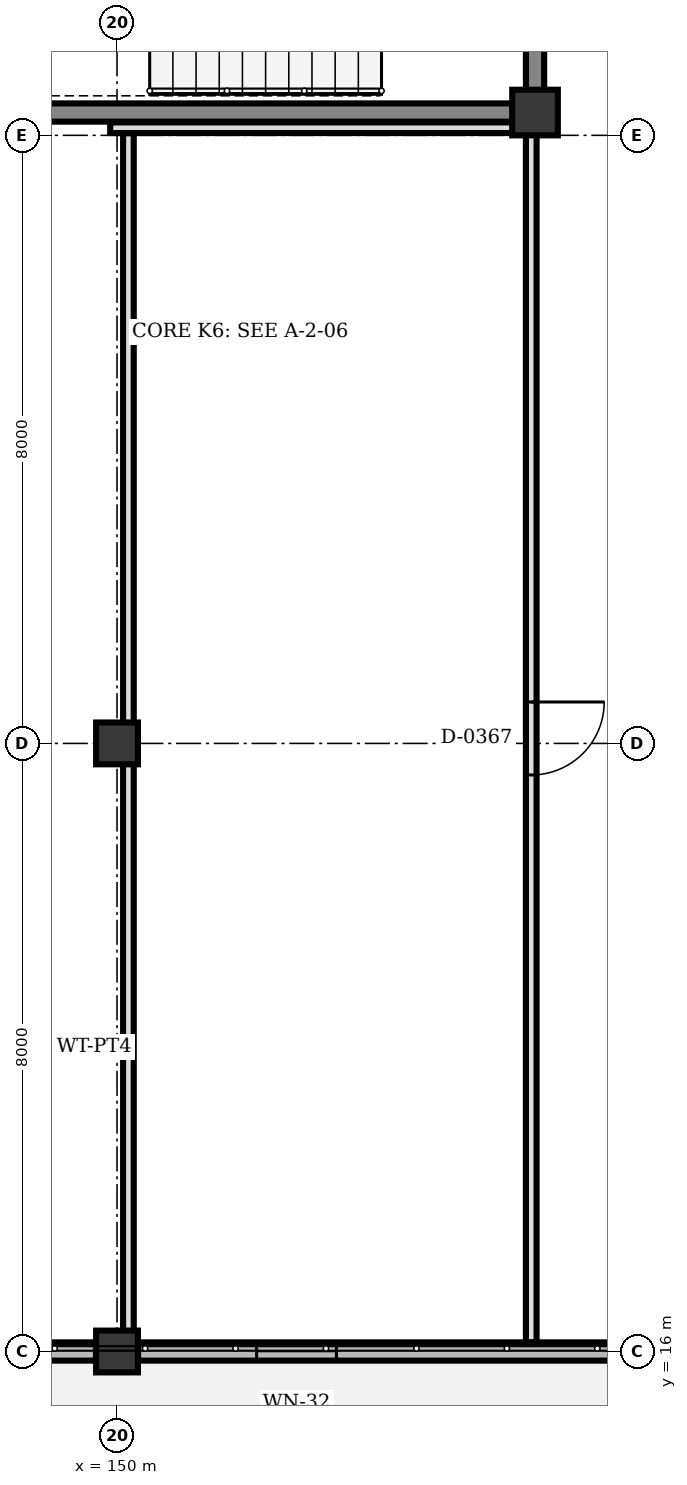
"""IFC4 building model, lengths in metres.
Left out: names, types, materials, properties, quantities, classifications, styles, units other than length and angle.
Written with IfcOpenShell. Run it as: python <this file> out.ifc"""

import sys

from ifc_helpers import new_model, si_unit, direction, frame, frame_2d, origin, origin_2d, place, context, subcontext, project, spatial, rectangle, extrude, element, fill, save


model = new_model("IFC4")
c1 = context("Model", 3, precision=1e-05, world=origin(), true_north=direction((0.0, 1.0)))
c2 = subcontext(c1, "Body", "Model", "MODEL_VIEW")
j1 = project(units=[si_unit("LENGTHUNIT", "METRE"), si_unit("PLANEANGLEUNIT", "RADIAN")], contexts=[c1])
p1 = place(None, origin())
s1 = spatial("IfcSite", under=j1, at=p1, CompositionType="ELEMENT")
p2 = place(p1, origin())
s2 = spatial("IfcBuilding", under=s1, at=p2, CompositionType="ELEMENT")
p3 = place(p2, frame((0.0, 0.0, 8.5)))
s3 = spatial("IfcBuildingStorey", under=s2, at=p3, CompositionType="ELEMENT", Elevation=8.5)
p4 = place(p3, frame((155.5, 32.3, 0.0), z_axis=(0.0, 0.0, 1.0), x_axis=(1.0, 0.0, 0.0)))
e1 = element("IfcColumn", 1, at=p4, inside=s3, PredefinedType="COLUMN", context=c2, shape_type="SweptSolid", body=[
    extrude(rectangle(XDim=0.6, YDim=0.6, at=origin_2d()), origin(), (0.0, 0.0, 1.0), 4.0),
])
for number, where, z_axis, x_axis in (
    (2, (150.0, 16.0, 0.0), (0.0, 0.0, 1.0), (1.0, 0.0, 0.0)),
    (3, (150.0, 24.0, 0.0), (0.0, 0.0, 1.0), (1.0, 0.0, 0.0)),
):
    element("IfcColumn", number, at=place(p3, frame(where, z_axis=z_axis, x_axis=x_axis)), inside=s3, PredefinedType="COLUMN", context=c2, shape_type="SweptSolid", body=[
        extrude(rectangle(XDim=0.55, YDim=0.55, at=origin_2d()), origin(), (0.0, 0.0, 1.0), 4.0),
    ])
p5 = place(p3, frame((157.723, 16.0, 0.0), z_axis=(0.0, 0.0, 1.0), x_axis=(-1.0, 0.0, 0.0)))
e4 = element("IfcWall", 4, at=p5, inside=s3, PredefinedType="SOLIDWALL", context=c2, shape_type="SweptSolid", body=[
    extrude(rectangle(XDim=7.446, YDim=0.24, at=frame_2d((3.723, 0.0))), origin(), (0.0, 0.0, 1.0), 3.002),
])
p6 = place(p5, frame((4.836, 0.0, 0.9)))
e5 = element("IfcOpeningElement", 5, at=p6, cuts=e4, PredefinedType="OPENING", context=c2, shape_type="SweptSolid", body=[
    extrude(rectangle(XDim=1.05, YDim=1.55, at=frame_2d((0.525, 0.775))), frame((0.0, 0.13, 0.0), z_axis=(0.0, -1.0, 0.0), x_axis=(1.0, 0.0, 0.0)), (0.0, 0.0, 1.0), 0.26),
])
p7 = place(p3, frame((149.723, 16.0, 0.0), z_axis=(0.0, 0.0, 1.0), x_axis=(-1.0, 0.0, 0.0)))
e6 = element("IfcWall", 6, at=p7, inside=s3, PredefinedType="SOLIDWALL", context=c2, shape_type="SweptSolid", body=[
    extrude(rectangle(XDim=7.446, YDim=0.24, at=frame_2d((3.723, 0.0))), origin(), (0.0, 0.0, 1.0), 3.002),
])
p8 = place(p7, frame((3.048, 0.0, 0.9)))
e7 = element("IfcOpeningElement", 7, at=p8, cuts=e6, PredefinedType="OPENING", context=c2, shape_type="SweptSolid", body=[
    extrude(rectangle(XDim=1.35, YDim=1.55, at=frame_2d((0.675, 0.775))), frame((0.0, 0.13, 0.0), z_axis=(0.0, -1.0, 0.0), x_axis=(1.0, 0.0, 0.0)), (0.0, 0.0, 1.0), 0.26),
])
p9 = place(p3, frame((155.5, 36.908, 0.0), z_axis=(0.0, 0.0, 1.0), x_axis=(0.0, -1.0, 0.0)))
e8 = element("IfcWall", 8, at=p9, inside=s3, PredefinedType="SHEAR", context=c2, shape_type="SweptSolid", body=[
    extrude(rectangle(XDim=4.316, YDim=0.24, at=frame_2d((2.158, 0.0))), origin(), (0.0, 0.0, 1.0), 3.74),
])
p10 = place(p9, frame((1.718, 0.0, 0.0)))
e9 = element("IfcOpeningElement", 9, at=p10, cuts=e8, PredefinedType="OPENING", context=c2, shape_type="SweptSolid", body=[
    extrude(rectangle(XDim=0.88, YDim=2.1, at=frame_2d((0.44, 1.05))), frame((0.0, 0.13, 0.0), z_axis=(0.0, -1.0, 0.0), x_axis=(1.0, 0.0, 0.0)), (0.0, 0.0, 1.0), 0.26),
])
p11 = place(p3, frame((155.208, 32.3, 0.0), z_axis=(0.0, 0.0, 1.0), x_axis=(-1.0, 0.0, 0.0)))
e10 = element("IfcWall", 10, at=p11, inside=s3, PredefinedType="SHEAR", context=c2, shape_type="SweptSolid", body=[
    extrude(rectangle(XDim=7.316, YDim=0.24, at=frame_2d((3.658, 0.0))), origin(), (0.0, 0.0, 1.0), 3.74),
])
p12 = place(p3, frame((149.91, 32.1, 0.0), z_axis=(0.0, 0.0, 1.0), x_axis=(1.0, 0.0, 0.0)))
e11 = element("IfcWall", 11, at=p12, inside=s3, PredefinedType="PARTITIONING", context=c2, shape_type="SweptSolid", body=[
    extrude(rectangle(XDim=5.298, YDim=0.14, at=frame_2d((2.649, 0.0))), origin(), (0.0, 0.0, 1.0), 3.7),
])
p13 = place(p3, frame((155.45, 32.008, 0.0), z_axis=(0.0, 0.0, 1.0), x_axis=(0.0, -1.0, 0.0)))
e12 = element("IfcWall", 12, at=p13, inside=s3, PredefinedType="PARTITIONING", context=c2, shape_type="SweptSolid", body=[
    extrude(rectangle(XDim=15.885, YDim=0.14, at=frame_2d((7.942, 0.0))), origin(), (0.0, 0.0, 1.0), 3.002),
])
p14 = place(p13, frame((7.463, 0.0, 0.0)))
e13 = element("IfcOpeningElement", 13, at=p14, cuts=e12, PredefinedType="OPENING", context=c2, shape_type="SweptSolid", body=[
    extrude(rectangle(XDim=0.96, YDim=2.1, at=frame_2d((0.48, 1.05))), frame((0.0, 0.08, 0.0), z_axis=(0.0, -1.0, 0.0), x_axis=(1.0, 0.0, 0.0)), (0.0, 0.0, 1.0), 0.16),
])
p15 = place(p3, frame((150.15, 16.267, 0.0), z_axis=(0.0, 0.0, 1.0), x_axis=(0.0, 1.0, 0.0)))
e14 = element("IfcWall", 14, at=p15, inside=s3, PredefinedType="PARTITIONING", context=c2, shape_type="SweptSolid", body=[
    extrude(rectangle(XDim=7.466, YDim=0.14, at=frame_2d((3.733, 0.0))), origin(), (0.0, 0.0, 1.0), 3.002),
])
p16 = place(p3, frame((150.15, 24.267, 0.0), z_axis=(0.0, 0.0, 1.0), x_axis=(0.0, 1.0, 0.0)))
e15 = element("IfcWall", 15, at=p16, inside=s3, PredefinedType="PARTITIONING", context=c2, shape_type="SweptSolid", body=[
    extrude(rectangle(XDim=7.76, YDim=0.14, at=frame_2d((3.88, 0.0))), origin(), (0.0, 0.0, 1.0), 3.002),
])
p17 = place(p6, origin())
e16 = element("IfcWindow", 16, at=p17, inside=s3, PartitioningType="SINGLE_PANEL", PredefinedType="WINDOW", context=c2, shape_type="SweptSolid", body=[
    extrude(rectangle(XDim=1.05, YDim=1.55, at=frame_2d((0.525, 0.775))), frame((0.0, 0.03, 0.0), z_axis=(0.0, -1.0, 0.0), x_axis=(1.0, 0.0, 0.0)), (0.0, 0.0, 1.0), 0.06),
])
fill(e5, e16)
p18 = place(p14, origin())
e17 = element("IfcDoor", 17, at=p18, inside=s3, OperationType="SINGLE_SWING_LEFT", PredefinedType="DOOR", context=c2, shape_type="SweptSolid", body=[
    extrude(rectangle(XDim=0.96, YDim=2.1, at=frame_2d((0.48, 1.05))), frame((0.0, 0.025, 0.0), z_axis=(0.0, -1.0, 0.0), x_axis=(1.0, 0.0, 0.0)), (0.0, 0.0, 1.0), 0.05),
])
fill(e13, e17)
save(model, sys.argv[1])
